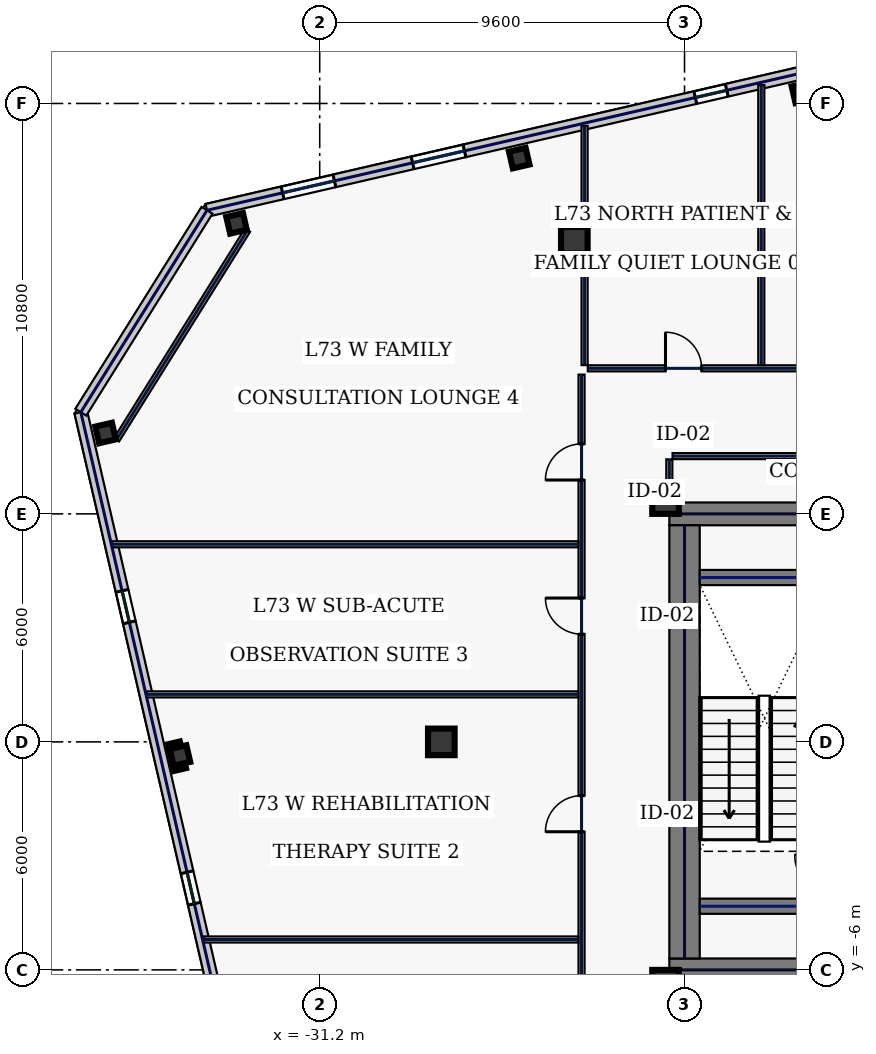
"""IFC4 building model, lengths in metres.
Left out: names, types, materials, properties, quantities, classifications, styles, units other than length and angle.
Written with IfcOpenShell. Run it as: python <this file> out.ifc"""

import sys

from ifc_helpers import new_model, si_unit, direction, frame, frame_2d, origin, origin_2d, place, context, subcontext, project, spatial, rectangle, hollow_rectangle, extrude, element, fill, save


model = new_model("IFC4")
c1 = context("Model", 3, precision=1e-05, world=origin(), true_north=direction((0.0, 1.0)))
c2 = subcontext(c1, "Body", "Model", "MODEL_VIEW")
j1 = project(units=[si_unit("LENGTHUNIT", "METRE"), si_unit("PLANEANGLEUNIT", "RADIAN")], contexts=[c1])
p1 = place(None, origin())
s1 = spatial("IfcSite", under=j1, at=p1, CompositionType="ELEMENT")
p2 = place(p1, origin())
s2 = spatial("IfcBuilding", under=s1, at=p2, CompositionType="ELEMENT")
p3 = place(p2, frame((0.0, 0.0, 313.0)))
s3 = spatial("IfcBuildingStorey", under=s2, at=p3, CompositionType="ELEMENT", Elevation=313.0)
for number, where, z_axis, x_axis in (
    (1, (-22.0, 6.0, 0.0), (0.0, 0.0, 1.0), (1.0, 0.0, 0.0)),
    (2, (-22.0, -6.0, 0.0), (0.0, 0.0, 1.0), (1.0, 0.0, 0.0)),
):
    element("IfcWall", number, at=place(p3, frame(where, z_axis=z_axis, x_axis=x_axis)), inside=s3, PredefinedType="SHEAR", context=c2, shape_type="SweptSolid", body=[
        extrude(rectangle(XDim=11.5, YDim=0.6, at=frame_2d((5.75, 0.0))), origin(), (0.0, 0.0, 1.0), 3.74),
    ])
p4 = place(p3, frame((-21.6, -5.7, 0.0), z_axis=(0.0, 0.0, 1.0), x_axis=(0.0, 1.0, 0.0)))
e3 = element("IfcWall", 3, at=p4, inside=s3, PredefinedType="SHEAR", context=c2, shape_type="SweptSolid", body=[
    extrude(rectangle(XDim=11.4, YDim=0.8, at=frame_2d((5.7, 0.0))), origin(), (0.0, 0.0, 1.0), 3.74),
])
for number, where, z_axis, x_axis in (
    (4, (-21.2, -4.325, 0.0), (0.0, 0.0, 1.0), (1.0, 0.0, 0.0)),
    (5, (-21.2, 4.325, 0.0), (0.0, 0.0, 1.0), (1.0, 0.0, 0.0)),
):
    element("IfcWall", number, at=place(p3, frame(where, z_axis=z_axis, x_axis=x_axis)), inside=s3, PredefinedType="SHEAR", context=c2, shape_type="SweptSolid", body=[
        extrude(rectangle(XDim=3.4, YDim=0.4, at=frame_2d((1.7, 0.0))), origin(), (0.0, 0.0, 1.0), 3.74),
    ])
for number, where, z_axis, x_axis in (
    (6, (-22.1, -6.35, 0.0), (0.0, 0.0, 1.0), (1.0, 0.0, 0.0)),
    (7, (-22.1, 6.35, 0.0), (0.0, 0.0, 1.0), (1.0, 0.0, 0.0)),
    (8, (-24.5, 13.2, 0.0), (0.0, 0.0, 1.0), (1.0, 0.0, 0.0)),
    (9, (-28.0, 0.0, 0.0), (0.0, 0.0, 1.0), (1.0, 0.0, 0.0)),
):
    element("IfcColumn", number, at=place(p3, frame(where, z_axis=z_axis, x_axis=x_axis)), inside=s3, PredefinedType="COLUMN", context=c2, shape_type="SweptSolid", body=[
        extrude(hollow_rectangle(XDim=0.7, YDim=0.7, WallThickness=0.032, at=origin_2d()), origin(), (0.0, 0.0, 1.0), 3.74),
    ])
for number, where, z_axis, x_axis in (
    (10, (-18.511, 17.08, 0.0), (0.0, 0.0, 1.0), (0.974, 0.225, 0.0)),
    (11, (-25.95, 15.362, 0.0), (0.0, 0.0, 1.0), (0.974, 0.225, 0.0)),
    (12, (-33.389, 13.645, 0.0), (0.0, 0.0, 1.0), (0.974, 0.225, 0.0)),
    (13, (-36.836, 8.128, 0.0), (0.0, 0.0, 1.0), (0.974, 0.225, 0.0)),
    (14, (-34.877, -0.359, 0.0), (0.0, 0.0, 1.0), (0.974, 0.225, 0.0)),
):
    element("IfcColumn", number, at=place(p3, frame(where, z_axis=z_axis, x_axis=x_axis)), inside=s3, PredefinedType="COLUMN", context=c2, shape_type="SweptSolid", body=[
        extrude(hollow_rectangle(XDim=0.45, YDim=0.45, WallThickness=0.022, at=origin_2d()), origin(), (0.0, 0.0, 1.0), 3.74),
    ])
p5 = place(p3, frame((-17.245, 17.895, 0.0), z_axis=(0.0, 0.0, 1.0), x_axis=(-0.97437318493, -0.224937539085, 0.0)))
e15 = element("IfcWall", 15, at=p5, inside=s3, PredefinedType="STANDARD", context=c2, shape_type="SweptSolid", body=[
    extrude(rectangle(XDim=17.366, YDim=0.34, at=frame_2d((8.683, 0.0))), origin(), (0.0, 0.0, 1.0), 3.74),
])
p6 = place(p5, frame((13.925, 0.0, 1.0)))
e16 = element("IfcOpeningElement", 16, at=p6, cuts=e15, PredefinedType="OPENING", context=c2, shape_type="SweptSolid", body=[
    extrude(rectangle(XDim=1.4, YDim=1.85, at=frame_2d((0.7, 0.925))), frame((0.0, 0.18, 0.0), z_axis=(0.0, -1.0, 0.0), x_axis=(1.0, 0.0, 0.0)), (0.0, 0.0, 1.0), 0.36),
])
p7 = place(p5, frame((10.413, 0.0, 1.0)))
e17 = element("IfcOpeningElement", 17, at=p7, cuts=e15, PredefinedType="OPENING", context=c2, shape_type="SweptSolid", body=[
    extrude(rectangle(XDim=1.4, YDim=1.85, at=frame_2d((0.7, 0.925))), frame((0.0, 0.18, 0.0), z_axis=(0.0, -1.0, 0.0), x_axis=(1.0, 0.0, 0.0)), (0.0, 0.0, 1.0), 0.36),
])
p8 = place(p5, frame((3.329, 0.0, 1.0)))
e18 = element("IfcOpeningElement", 18, at=p8, cuts=e15, PredefinedType="OPENING", context=c2, shape_type="SweptSolid", body=[
    extrude(rectangle(XDim=0.85, YDim=1.85, at=frame_2d((0.425, 0.925))), frame((0.0, 0.18, 0.0), z_axis=(0.0, -1.0, 0.0), x_axis=(1.0, 0.0, 0.0)), (0.0, 0.0, 1.0), 0.36),
])
p9 = place(p3, frame((-37.486, 8.676, 0.0), z_axis=(0.0, 0.0, 1.0), x_axis=(0.224953091034, -0.974369594576, 0.0)))
e19 = element("IfcWall", 19, at=p9, inside=s3, PredefinedType="STANDARD", context=c2, shape_type="SweptSolid", body=[
    extrude(rectangle(XDim=36.2, YDim=0.34, at=frame_2d((18.1, 0.0))), origin(), (0.0, 0.0, 1.0), 3.74),
])
p10 = place(p9, frame((4.825, 0.0, 0.75)))
e20 = element("IfcOpeningElement", 20, at=p10, cuts=e19, PredefinedType="OPENING", context=c2, shape_type="SweptSolid", body=[
    extrude(rectangle(XDim=0.85, YDim=1.85, at=frame_2d((0.425, 0.925))), frame((0.0, 0.18, 0.0), z_axis=(0.0, -1.0, 0.0), x_axis=(1.0, 0.0, 0.0)), (0.0, 0.0, 1.0), 0.36),
])
p11 = place(p9, frame((12.425, 0.0, 0.75)))
e21 = element("IfcOpeningElement", 21, at=p11, cuts=e19, PredefinedType="OPENING", context=c2, shape_type="SweptSolid", body=[
    extrude(rectangle(XDim=0.85, YDim=1.85, at=frame_2d((0.425, 0.925))), frame((0.0, 0.18, 0.0), z_axis=(0.0, -1.0, 0.0), x_axis=(1.0, 0.0, 0.0)), (0.0, 0.0, 1.0), 0.36),
])
p12 = place(p9, frame((21.825, 0.0, 0.58)))
e22 = element("IfcOpeningElement", 22, at=p12, cuts=e19, PredefinedType="OPENING", context=c2, shape_type="SweptSolid", body=[
    extrude(rectangle(XDim=1.6, YDim=2.3, at=frame_2d((0.8, 1.15))), frame((0.0, 0.18, 0.0), z_axis=(0.0, -1.0, 0.0), x_axis=(1.0, 0.0, 0.0)), (0.0, 0.0, 1.0), 0.36),
])
p13 = place(p9, frame((30.875, 0.0, 0.58)))
e23 = element("IfcOpeningElement", 23, at=p13, cuts=e19, PredefinedType="OPENING", context=c2, shape_type="SweptSolid", body=[
    extrude(rectangle(XDim=1.6, YDim=2.3, at=frame_2d((0.8, 1.15))), frame((0.0, 0.18, 0.0), z_axis=(0.0, -1.0, 0.0), x_axis=(1.0, 0.0, 0.0)), (0.0, 0.0, 1.0), 0.36),
])
p14 = place(p3, frame((-34.166, 13.989, 0.0), z_axis=(0.0, 0.0, 1.0), x_axis=(-0.529935887993, -0.848037708252, 0.0)))
e24 = element("IfcWall", 24, at=p14, inside=s3, PredefinedType="STANDARD", context=c2, shape_type="SweptSolid", body=[
    extrude(rectangle(XDim=6.265, YDim=0.34, at=frame_2d((3.133, 0.0))), origin(), (0.0, 0.0, 1.0), 3.74),
])
p15 = place(p3, frame((-33.1, 13.465, 0.0), z_axis=(0.0, 0.0, 1.0), x_axis=(-0.529958457806, -0.848023604035, 0.0)))
e25 = element("IfcWall", 25, at=p15, inside=s3, PredefinedType="PARTITIONING", context=c2, shape_type="SweptSolid", body=[
    extrude(rectangle(XDim=6.505, YDim=0.16, at=frame_2d((3.252, 0.0))), origin(), (0.0, 0.0, 1.0), 3.74),
])
p16 = place(p3, frame((-24.31, -9.615, 0.0), z_axis=(0.0, 0.0, 1.0), x_axis=(0.0, 1.0, 0.0)))
e26 = element("IfcWall", 26, at=p16, inside=s3, PredefinedType="PARTITIONING", context=c2, shape_type="SweptSolid", body=[
    extrude(rectangle(XDim=19.28, YDim=0.16, at=frame_2d((9.64, 0.0))), origin(), (0.0, 0.0, 1.0), 3.74),
])
p17 = place(p16, frame((1.969, 0.0, 0.0)))
e27 = element("IfcOpeningElement", 27, at=p17, cuts=e26, PredefinedType="OPENING", context=c2, shape_type="SweptSolid", body=[
    extrude(rectangle(XDim=0.95, YDim=2.2, at=frame_2d((0.475, 1.1))), frame((0.0, 0.09, 0.0), z_axis=(0.0, -1.0, 0.0), x_axis=(1.0, 0.0, 0.0)), (0.0, 0.0, 1.0), 0.18),
])
p18 = place(p16, frame((7.25, 0.0, 0.0)))
e28 = element("IfcOpeningElement", 28, at=p18, cuts=e26, PredefinedType="OPENING", context=c2, shape_type="SweptSolid", body=[
    extrude(rectangle(XDim=0.95, YDim=2.2, at=frame_2d((0.475, 1.1))), frame((0.0, 0.09, 0.0), z_axis=(0.0, -1.0, 0.0), x_axis=(1.0, 0.0, 0.0)), (0.0, 0.0, 1.0), 0.18),
])
p19 = place(p16, frame((12.45, 0.0, 0.0)))
e29 = element("IfcOpeningElement", 29, at=p19, cuts=e26, PredefinedType="OPENING", context=c2, shape_type="SweptSolid", body=[
    extrude(rectangle(XDim=0.95, YDim=2.2, at=frame_2d((0.475, 1.1))), frame((0.0, 0.09, 0.0), z_axis=(0.0, -1.0, 0.0), x_axis=(1.0, 0.0, 0.0)), (0.0, 0.0, 1.0), 0.18),
])
p20 = place(p16, frame((16.506, 0.0, 0.0)))
e30 = element("IfcOpeningElement", 30, at=p20, cuts=e26, PredefinedType="OPENING", context=c2, shape_type="SweptSolid", body=[
    extrude(rectangle(XDim=0.95, YDim=2.2, at=frame_2d((0.475, 1.1))), frame((0.0, 0.09, 0.0), z_axis=(0.0, -1.0, 0.0), x_axis=(1.0, 0.0, 0.0)), (0.0, 0.0, 1.0), 0.18),
])
p21 = place(p3, frame((-24.145, 9.83, 0.0), z_axis=(0.0, 0.0, 1.0), x_axis=(1.0, 0.0, 0.0)))
e31 = element("IfcWall", 31, at=p21, inside=s3, PredefinedType="PARTITIONING", context=c2, shape_type="SweptSolid", body=[
    extrude(rectangle(XDim=48.29, YDim=0.16, at=frame_2d((24.145, 0.0))), origin(), (0.0, 0.0, 1.0), 3.74),
])
p22 = place(p21, frame((2.044, 0.0, 0.0)))
e32 = element("IfcOpeningElement", 32, at=p22, cuts=e31, PredefinedType="OPENING", context=c2, shape_type="SweptSolid", body=[
    extrude(rectangle(XDim=0.95, YDim=2.2, at=frame_2d((0.475, 1.1))), frame((0.0, 0.09, 0.0), z_axis=(0.0, -1.0, 0.0), x_axis=(1.0, 0.0, 0.0)), (0.0, 0.0, 1.0), 0.18),
])
p23 = place(p21, frame((6.54, 0.0, 0.0)))
e33 = element("IfcOpeningElement", 33, at=p23, cuts=e31, PredefinedType="OPENING", context=c2, shape_type="SweptSolid", body=[
    extrude(rectangle(XDim=1.3, YDim=2.2, at=frame_2d((0.65, 1.1))), frame((0.0, 0.09, 0.0), z_axis=(0.0, -1.0, 0.0), x_axis=(1.0, 0.0, 0.0)), (0.0, 0.0, 1.0), 0.18),
])
p24 = place(p21, frame((13.83, 0.0, 0.0)))
e34 = element("IfcOpeningElement", 34, at=p24, cuts=e31, PredefinedType="OPENING", context=c2, shape_type="SweptSolid", body=[
    extrude(rectangle(XDim=1.45, YDim=2.2, at=frame_2d((0.725, 1.1))), frame((0.0, 0.09, 0.0), z_axis=(0.0, -1.0, 0.0), x_axis=(1.0, 0.0, 0.0)), (0.0, 0.0, 1.0), 0.18),
])
p25 = place(p21, frame((22.43, 0.0, 0.0)))
e35 = element("IfcOpeningElement", 35, at=p25, cuts=e31, PredefinedType="OPENING", context=c2, shape_type="SweptSolid", body=[
    extrude(rectangle(XDim=1.15, YDim=2.2, at=frame_2d((0.575, 1.1))), frame((0.0, 0.09, 0.0), z_axis=(0.0, -1.0, 0.0), x_axis=(1.0, 0.0, 0.0)), (0.0, 0.0, 1.0), 0.18),
])
p26 = place(p21, frame((29.81, 0.0, 0.0)))
e36 = element("IfcOpeningElement", 36, at=p26, cuts=e31, PredefinedType="OPENING", context=c2, shape_type="SweptSolid", body=[
    extrude(rectangle(XDim=0.95, YDim=2.2, at=frame_2d((0.475, 1.1))), frame((0.0, 0.09, 0.0), z_axis=(0.0, -1.0, 0.0), x_axis=(1.0, 0.0, 0.0)), (0.0, 0.0, 1.0), 0.18),
])
p27 = place(p21, frame((36.28, 0.0, 0.0)))
e37 = element("IfcOpeningElement", 37, at=p27, cuts=e31, PredefinedType="OPENING", context=c2, shape_type="SweptSolid", body=[
    extrude(rectangle(XDim=1.3, YDim=2.2, at=frame_2d((0.65, 1.1))), frame((0.0, 0.09, 0.0), z_axis=(0.0, -1.0, 0.0), x_axis=(1.0, 0.0, 0.0)), (0.0, 0.0, 1.0), 0.18),
])
p28 = place(p21, frame((43.976, 0.0, 0.0)))
e38 = element("IfcOpeningElement", 38, at=p28, cuts=e31, PredefinedType="OPENING", context=c2, shape_type="SweptSolid", body=[
    extrude(rectangle(XDim=0.95, YDim=2.2, at=frame_2d((0.475, 1.1))), frame((0.0, 0.09, 0.0), z_axis=(0.0, -1.0, 0.0), x_axis=(1.0, 0.0, 0.0)), (0.0, 0.0, 1.0), 0.18),
])
p29 = place(p3, frame((-10.715, 7.52, 0.0), z_axis=(0.0, 0.0, 1.0), x_axis=(-1.0, 0.0, 0.0)))
e39 = element("IfcWall", 39, at=p29, inside=s3, PredefinedType="PARTITIONING", context=c2, shape_type="SweptSolid", body=[
    extrude(rectangle(XDim=11.2, YDim=0.16, at=frame_2d((5.6, 0.0))), origin(), (0.0, 0.0, 1.0), 3.74),
])
p30 = place(p3, frame((-22.0, 7.435, 0.0), z_axis=(0.0, 0.0, 1.0), x_axis=(0.0, -1.0, 0.0)))
e40 = element("IfcWall", 40, at=p30, inside=s3, PredefinedType="PARTITIONING", context=c2, shape_type="SweptSolid", body=[
    extrude(rectangle(XDim=1.015, YDim=0.16, at=frame_2d((0.508, 0.0))), origin(), (0.0, 0.0, 1.0), 3.74),
])
p31 = place(p3, frame((-24.23, 9.915, 0.0), z_axis=(0.0, 0.0, 1.0), x_axis=(0.0, 1.0, 0.0)))
e41 = element("IfcWall", 41, at=p31, inside=s3, PredefinedType="PARTITIONING", context=c2, shape_type="SweptSolid", body=[
    extrude(rectangle(XDim=6.296, YDim=0.16, at=frame_2d((3.148, 0.0))), origin(), (0.0, 0.0, 1.0), 3.74),
])
p32 = place(p3, frame((-19.58, 9.915, 0.0), z_axis=(0.0, 0.0, 1.0), x_axis=(0.0, 1.0, 0.0)))
e42 = element("IfcWall", 42, at=p32, inside=s3, PredefinedType="PARTITIONING", context=c2, shape_type="SweptSolid", body=[
    extrude(rectangle(XDim=7.369, YDim=0.16, at=frame_2d((3.685, 0.0))), origin(), (0.0, 0.0, 1.0), 3.74),
])
p33 = place(p3, frame((-34.262, -5.2, 0.0), z_axis=(0.0, 0.0, 1.0), x_axis=(1.0, 0.0, 0.0)))
e43 = element("IfcWall", 43, at=p33, inside=s3, PredefinedType="PARTITIONING", context=c2, shape_type="SweptSolid", body=[
    extrude(rectangle(XDim=9.867, YDim=0.16, at=frame_2d((4.933, 0.0))), origin(), (0.0, 0.0, 1.0), 3.74),
])
p34 = place(p3, frame((-35.751, 1.25, 0.0), z_axis=(0.0, 0.0, 1.0), x_axis=(1.0, 0.0, 0.0)))
e44 = element("IfcWall", 44, at=p34, inside=s3, PredefinedType="PARTITIONING", context=c2, shape_type="SweptSolid", body=[
    extrude(rectangle(XDim=11.356, YDim=0.16, at=frame_2d((5.678, 0.0))), origin(), (0.0, 0.0, 1.0), 3.74),
])
p35 = place(p3, frame((-36.663, 5.2, 0.0), z_axis=(0.0, 0.0, 1.0), x_axis=(1.0, 0.0, 0.0)))
e45 = element("IfcWall", 45, at=p35, inside=s3, PredefinedType="PARTITIONING", context=c2, shape_type="SweptSolid", body=[
    extrude(rectangle(XDim=12.268, YDim=0.16, at=frame_2d((6.134, 0.0))), origin(), (0.0, 0.0, 1.0), 3.74),
])
p36 = place(p6, origin())
e46 = element("IfcWindow", 46, at=p36, inside=s3, PartitioningType="SINGLE_PANEL", PredefinedType="WINDOW", context=c2, shape_type="SweptSolid", body=[
    extrude(rectangle(XDim=1.4, YDim=1.85, at=frame_2d((0.7, 0.925))), frame((0.0, 0.03, 0.0), z_axis=(0.0, -1.0, 0.0), x_axis=(1.0, 0.0, 0.0)), (0.0, 0.0, 1.0), 0.06),
])
fill(e16, e46)
p37 = place(p7, origin())
e47 = element("IfcWindow", 47, at=p37, inside=s3, PartitioningType="SINGLE_PANEL", PredefinedType="WINDOW", context=c2, shape_type="SweptSolid", body=[
    extrude(rectangle(XDim=1.4, YDim=1.85, at=frame_2d((0.7, 0.925))), frame((0.0, 0.03, 0.0), z_axis=(0.0, -1.0, 0.0), x_axis=(1.0, 0.0, 0.0)), (0.0, 0.0, 1.0), 0.06),
])
fill(e17, e47)
p38 = place(p8, origin())
e48 = element("IfcWindow", 48, at=p38, inside=s3, PartitioningType="SINGLE_PANEL", PredefinedType="WINDOW", context=c2, shape_type="SweptSolid", body=[
    extrude(rectangle(XDim=0.85, YDim=1.85, at=frame_2d((0.425, 0.925))), frame((0.0, 0.03, 0.0), z_axis=(0.0, -1.0, 0.0), x_axis=(1.0, 0.0, 0.0)), (0.0, 0.0, 1.0), 0.06),
])
fill(e18, e48)
p39 = place(p10, origin())
e49 = element("IfcWindow", 49, at=p39, inside=s3, PartitioningType="SINGLE_PANEL", PredefinedType="WINDOW", context=c2, shape_type="SweptSolid", body=[
    extrude(rectangle(XDim=0.85, YDim=1.85, at=frame_2d((0.425, 0.925))), frame((0.0, 0.03, 0.0), z_axis=(0.0, -1.0, 0.0), x_axis=(1.0, 0.0, 0.0)), (0.0, 0.0, 1.0), 0.06),
])
fill(e20, e49)
p40 = place(p11, origin())
e50 = element("IfcWindow", 50, at=p40, inside=s3, PartitioningType="SINGLE_PANEL", PredefinedType="WINDOW", context=c2, shape_type="SweptSolid", body=[
    extrude(rectangle(XDim=0.85, YDim=1.85, at=frame_2d((0.425, 0.925))), frame((0.0, 0.03, 0.0), z_axis=(0.0, -1.0, 0.0), x_axis=(1.0, 0.0, 0.0)), (0.0, 0.0, 1.0), 0.06),
])
fill(e21, e50)
p41 = place(p22, origin())
e51 = element("IfcDoor", 51, at=p41, inside=s3, OperationType="SINGLE_SWING_LEFT", PredefinedType="DOOR", context=c2, shape_type="SweptSolid", body=[
    extrude(rectangle(XDim=0.95, YDim=2.2, at=frame_2d((0.475, 1.1))), frame((0.0, 0.025, 0.0), z_axis=(0.0, -1.0, 0.0), x_axis=(1.0, 0.0, 0.0)), (0.0, 0.0, 1.0), 0.05),
])
fill(e32, e51)
p42 = place(p18, origin())
e52 = element("IfcDoor", 52, at=p42, inside=s3, OperationType="SINGLE_SWING_LEFT", PredefinedType="DOOR", context=c2, shape_type="SweptSolid", body=[
    extrude(rectangle(XDim=0.95, YDim=2.2, at=frame_2d((0.475, 1.1))), frame((0.0, 0.025, 0.0), z_axis=(0.0, -1.0, 0.0), x_axis=(1.0, 0.0, 0.0)), (0.0, 0.0, 1.0), 0.05),
])
fill(e28, e52)
p43 = place(p19, origin())
e53 = element("IfcDoor", 53, at=p43, inside=s3, OperationType="SINGLE_SWING_RIGHT", PredefinedType="DOOR", context=c2, shape_type="SweptSolid", body=[
    extrude(rectangle(XDim=0.95, YDim=2.2, at=frame_2d((0.475, 1.1))), frame((0.0, 0.025, 0.0), z_axis=(0.0, -1.0, 0.0), x_axis=(1.0, 0.0, 0.0)), (0.0, 0.0, 1.0), 0.05),
])
fill(e29, e53)
p44 = place(p20, origin())
e54 = element("IfcDoor", 54, at=p44, inside=s3, OperationType="SINGLE_SWING_LEFT", PredefinedType="DOOR", context=c2, shape_type="SweptSolid", body=[
    extrude(rectangle(XDim=0.95, YDim=2.2, at=frame_2d((0.475, 1.1))), frame((0.0, 0.025, 0.0), z_axis=(0.0, -1.0, 0.0), x_axis=(1.0, 0.0, 0.0)), (0.0, 0.0, 1.0), 0.05),
])
fill(e30, e54)
save(model, sys.argv[1])
